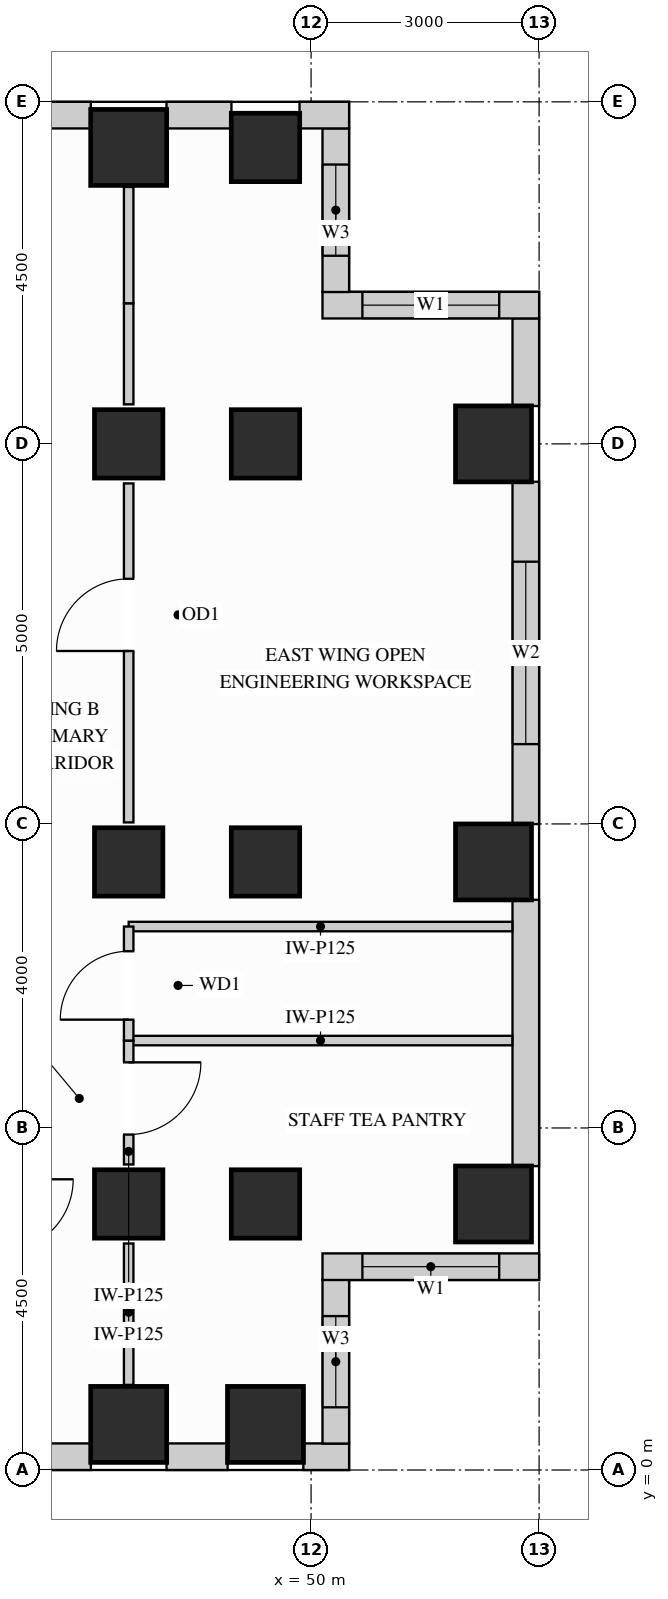
"""IFC4 building model, lengths in metres.
Left out: names, types, materials, properties, quantities, classifications, styles, units other than length and angle.
Written with IfcOpenShell. Run it as: python <this file> out.ifc"""

import sys

from ifc_helpers import new_model, si_unit, direction, frame, frame_2d, origin, origin_2d, place, context, subcontext, project, spatial, rectangle, extrude, source, transform, mapped, element, fill, save


model = new_model("IFC4")
c1 = context("Model", 3, precision=1e-05, world=origin(), true_north=direction((0.0, 1.0)))
c2 = subcontext(c1, "Body", "Model", "MODEL_VIEW")
j1 = project(units=[si_unit("LENGTHUNIT", "METRE"), si_unit("PLANEANGLEUNIT", "RADIAN")], contexts=[c1])
p1 = place(None, origin())
s1 = spatial("IfcSite", under=j1, at=p1, CompositionType="ELEMENT")
p2 = place(p1, origin())
s2 = spatial("IfcBuilding", under=s1, at=p2, CompositionType="ELEMENT")
p3 = place(p2, frame((0.0, 0.0, 200.7)))
s3 = spatial("IfcBuildingStorey", under=s2, at=p3, CompositionType="ELEMENT", Elevation=200.7)
m1 = source(origin(), c2, "Body", "SweptSolid", [
    extrude(rectangle(XDim=0.9, YDim=0.9, at=origin_2d()), origin(), (0.0, 0.0, 1.0), 3.4),
])
for number, where, z_axis, x_axis in (
    (1, (47.6, 13.5, 0.0), (0.0, 0.0, 1.0), (1.0, 0.0, 0.0)),
    (2, (47.6, 3.5, 0.0), (0.0, 0.0, 1.0), (1.0, 0.0, 0.0)),
    (3, (47.6, 8.0, 0.0), (0.0, 0.0, 1.0), (1.0, 0.0, 0.0)),
    (4, (49.4, 13.5, 0.0), (0.0, 0.0, 1.0), (1.0, 0.0, 0.0)),
    (5, (49.4, 17.4, 0.0), (0.0, 0.0, 1.0), (1.0, 0.0, 0.0)),
    (6, (49.4, 3.5, 0.0), (0.0, 0.0, 1.0), (1.0, 0.0, 0.0)),
    (7, (49.4, 8.0, 0.0), (0.0, 0.0, 1.0), (1.0, 0.0, 0.0)),
):
    element("IfcColumn", number, at=place(p3, frame(where, z_axis=z_axis, x_axis=x_axis)), inside=s3, PredefinedType="COLUMN", context=c2, shape_type="MappedRepresentation", body=[
        mapped(m1, transform((0.0, 0.0, 0.0), x_axis=(1.0, 0.0, 0.0), y_axis=(0.0, 1.0, 0.0), z_axis=(0.0, 0.0, 1.0))),
    ])
m2 = source(origin(), c2, "Body", "SweptSolid", [
    extrude(rectangle(XDim=1.0, YDim=1.0, at=origin_2d()), origin(), (0.0, 0.0, 1.0), 3.4),
])
for number, where, z_axis, x_axis in (
    (8, (47.6, 17.4, 0.0), (0.0, 0.0, 1.0), (1.0, 0.0, 0.0)),
    (9, (52.4, 13.5, 0.0), (0.0, 0.0, 1.0), (1.0, 0.0, 0.0)),
    (10, (52.4, 3.5, 0.0), (0.0, 0.0, 1.0), (1.0, 0.0, 0.0)),
    (11, (52.4, 8.0, 0.0), (0.0, 0.0, 1.0), (1.0, 0.0, 0.0)),
    (12, (47.6, 0.6, 0.0), (0.0, 0.0, 1.0), (1.0, 0.0, 0.0)),
    (13, (49.4, 0.6, 0.0), (0.0, 0.0, 1.0), (1.0, 0.0, 0.0)),
):
    element("IfcColumn", number, at=place(p3, frame(where, z_axis=z_axis, x_axis=x_axis)), inside=s3, PredefinedType="COLUMN", context=c2, shape_type="MappedRepresentation", body=[
        mapped(m2, transform((0.0, 0.0, 0.0), x_axis=(1.0, 0.0, 0.0), y_axis=(0.0, 1.0, 0.0), z_axis=(0.0, 0.0, 1.0))),
    ])
p4 = place(p3, frame((40.498, 0.175, 0.0), z_axis=(0.0, 0.0, 1.0), x_axis=(1.0, 0.0, 0.0)))
e14 = element("IfcWall", 14, at=p4, inside=s3, PredefinedType="SOLIDWALL", context=c2, shape_type="SweptSolid", body=[
    extrude(rectangle(XDim=6.604, YDim=0.35, at=frame_2d((3.302, 0.0))), origin(), (0.0, 0.0, 1.0), 2.612),
])
p5 = place(p4, frame((0.737, 0.0, 0.78)))
e15 = element("IfcOpeningElement", 15, at=p5, cuts=e14, PredefinedType="OPENING", context=c2, shape_type="SweptSolid", body=[
    extrude(rectangle(XDim=1.8, YDim=1.652, at=frame_2d((0.9, 0.826))), frame((0.0, 0.185, 0.0), z_axis=(0.0, -1.0, 0.0), x_axis=(1.0, 0.0, 0.0)), (0.0, 0.0, 1.0), 0.37),
])
p6 = place(p4, frame((2.955, 0.0, 0.78)))
e16 = element("IfcOpeningElement", 16, at=p6, cuts=e14, PredefinedType="OPENING", context=c2, shape_type="SweptSolid", body=[
    extrude(rectangle(XDim=1.8, YDim=1.652, at=frame_2d((0.9, 0.826))), frame((0.0, 0.185, 0.0), z_axis=(0.0, -1.0, 0.0), x_axis=(1.0, 0.0, 0.0)), (0.0, 0.0, 1.0), 0.37),
])
m3 = source(origin(), c2, "Body", "SweptSolid", [
    extrude(rectangle(XDim=0.804, YDim=0.35, at=frame_2d((0.402, 0.0))), origin(), (0.0, 0.0, 1.0), 3.385),
])
p7 = place(p3, frame((48.098, 0.175, 0.0), z_axis=(0.0, 0.0, 1.0), x_axis=(1.0, 0.0, 0.0)))
e17 = element("IfcWall", 17, at=p7, inside=s3, PredefinedType="SOLIDWALL", context=c2, shape_type="MappedRepresentation", body=[
    mapped(m3, transform((0.0, 0.0, 0.0), x_axis=(1.0, 0.0, 0.0), y_axis=(0.0, 1.0, 0.0), z_axis=(0.0, 0.0, 1.0))),
])
m4 = source(origin(), c2, "Body", "SweptSolid", [
    extrude(rectangle(XDim=0.602, YDim=0.35, at=frame_2d((0.301, 0.0))), origin(), (0.0, 0.0, 1.0), 3.385),
])
p8 = place(p3, frame((49.898, 0.175, 0.0), z_axis=(0.0, 0.0, 1.0), x_axis=(1.0, 0.0, 0.0)))
e18 = element("IfcWall", 18, at=p8, inside=s3, PredefinedType="SOLIDWALL", context=c2, shape_type="MappedRepresentation", body=[
    mapped(m4, transform((0.0, 0.0, 0.0), x_axis=(1.0, 0.0, 0.0), y_axis=(0.0, 1.0, 0.0), z_axis=(0.0, 0.0, 1.0))),
])
p9 = place(p3, frame((50.325, 0.348, 0.0), z_axis=(0.0, 0.0, 1.0), x_axis=(0.0, 1.0, 0.0)))
e19 = element("IfcWall", 19, at=p9, inside=s3, PredefinedType="SOLIDWALL", context=c2, shape_type="SweptSolid", body=[
    extrude(rectangle(XDim=2.154, YDim=0.35, at=frame_2d((1.077, 0.0))), origin(), (0.0, 0.0, 1.0), 3.385),
])
p10 = place(p9, frame((0.477, 0.0, 0.78)))
e20 = element("IfcOpeningElement", 20, at=p10, cuts=e19, PredefinedType="OPENING", context=c2, shape_type="SweptSolid", body=[
    extrude(rectangle(XDim=1.2, YDim=2.1, at=frame_2d((0.6, 1.05))), frame((0.0, 0.185, 0.0), z_axis=(0.0, -1.0, 0.0), x_axis=(1.0, 0.0, 0.0)), (0.0, 0.0, 1.0), 0.37),
])
p11 = place(p3, frame((50.15, 2.675, 0.0), z_axis=(0.0, 0.0, 1.0), x_axis=(1.0, 0.0, 0.0)))
e21 = element("IfcWall", 21, at=p11, inside=s3, PredefinedType="SOLIDWALL", context=c2, shape_type="SweptSolid", body=[
    extrude(rectangle(XDim=2.85, YDim=0.35, at=frame_2d((1.425, 0.0))), origin(), (0.0, 0.0, 1.0), 3.385),
])
p12 = place(p11, frame((0.525, 0.0, 0.78)))
e22 = element("IfcOpeningElement", 22, at=p12, cuts=e21, PredefinedType="OPENING", context=c2, shape_type="SweptSolid", body=[
    extrude(rectangle(XDim=1.8, YDim=2.1, at=frame_2d((0.9, 1.05))), frame((0.0, 0.185, 0.0), z_axis=(0.0, -1.0, 0.0), x_axis=(1.0, 0.0, 0.0)), (0.0, 0.0, 1.0), 0.37),
])
m5 = source(origin(), c2, "Body", "SweptSolid", [
    extrude(rectangle(XDim=3.504, YDim=0.35, at=frame_2d((1.752, 0.0))), origin(), (0.0, 0.0, 1.0), 2.612),
])
p13 = place(p3, frame((52.825, 3.998, 0.0), z_axis=(0.0, 0.0, 1.0), x_axis=(0.0, 1.0, 0.0)))
e23 = element("IfcWall", 23, at=p13, inside=s3, PredefinedType="SOLIDWALL", context=c2, shape_type="MappedRepresentation", body=[
    mapped(m5, transform((0.0, 0.0, 0.0), x_axis=(1.0, 0.0, 0.0), y_axis=(0.0, 1.0, 0.0), z_axis=(0.0, 0.0, 1.0))),
])
p14 = place(p3, frame((52.825, 8.498, 0.0), z_axis=(0.0, 0.0, 1.0), x_axis=(0.0, 1.0, 0.0)))
e24 = element("IfcWall", 24, at=p14, inside=s3, PredefinedType="SOLIDWALL", context=c2, shape_type="SweptSolid", body=[
    extrude(rectangle(XDim=4.504, YDim=0.35, at=frame_2d((2.252, 0.0))), origin(), (0.0, 0.0, 1.0), 2.612),
])
p15 = place(p14, frame((1.052, 0.0, 0.78)))
e25 = element("IfcOpeningElement", 25, at=p15, cuts=e24, PredefinedType="OPENING", context=c2, shape_type="SweptSolid", body=[
    extrude(rectangle(XDim=2.4, YDim=1.652, at=frame_2d((1.2, 0.826))), frame((0.0, 0.185, 0.0), z_axis=(0.0, -1.0, 0.0), x_axis=(1.0, 0.0, 0.0)), (0.0, 0.0, 1.0), 0.37),
])
m6 = source(origin(), c2, "Body", "SweptSolid", [
    extrude(rectangle(XDim=1.154, YDim=0.35, at=frame_2d((0.577, 0.0))), origin(), (0.0, 0.0, 1.0), 3.385),
])
p16 = place(p3, frame((52.825, 13.998, 0.0), z_axis=(0.0, 0.0, 1.0), x_axis=(0.0, 1.0, 0.0)))
e26 = element("IfcWall", 26, at=p16, inside=s3, PredefinedType="SOLIDWALL", context=c2, shape_type="MappedRepresentation", body=[
    mapped(m6, transform((0.0, 0.0, 0.0), x_axis=(1.0, 0.0, 0.0), y_axis=(0.0, 1.0, 0.0), z_axis=(0.0, 0.0, 1.0))),
])
p17 = place(p3, frame((53.0, 15.325, 0.0), z_axis=(0.0, 0.0, 1.0), x_axis=(-1.0, 0.0, 0.0)))
e27 = element("IfcWall", 27, at=p17, inside=s3, PredefinedType="SOLIDWALL", context=c2, shape_type="SweptSolid", body=[
    extrude(rectangle(XDim=2.85, YDim=0.35, at=frame_2d((1.425, 0.0))), origin(), (0.0, 0.0, 1.0), 3.385),
])
p18 = place(p17, frame((0.525, 0.0, 0.78)))
e28 = element("IfcOpeningElement", 28, at=p18, cuts=e27, PredefinedType="OPENING", context=c2, shape_type="SweptSolid", body=[
    extrude(rectangle(XDim=1.8, YDim=2.1, at=frame_2d((0.9, 1.05))), frame((0.0, 0.185, 0.0), z_axis=(0.0, -1.0, 0.0), x_axis=(1.0, 0.0, 0.0)), (0.0, 0.0, 1.0), 0.37),
])
p19 = place(p3, frame((50.325, 15.498, 0.0), z_axis=(0.0, 0.0, 1.0), x_axis=(0.0, 1.0, 0.0)))
e29 = element("IfcWall", 29, at=p19, inside=s3, PredefinedType="SOLIDWALL", context=c2, shape_type="SweptSolid", body=[
    extrude(rectangle(XDim=2.154, YDim=0.35, at=frame_2d((1.077, 0.0))), origin(), (0.0, 0.0, 1.0), 3.385),
])
p20 = place(p19, frame((0.477, 0.0, 0.78)))
e30 = element("IfcOpeningElement", 30, at=p20, cuts=e29, PredefinedType="OPENING", context=c2, shape_type="SweptSolid", body=[
    extrude(rectangle(XDim=1.2, YDim=2.1, at=frame_2d((0.6, 1.05))), frame((0.0, 0.185, 0.0), z_axis=(0.0, -1.0, 0.0), x_axis=(1.0, 0.0, 0.0)), (0.0, 0.0, 1.0), 0.37),
])
m7 = source(origin(), c2, "Body", "SweptSolid", [
    extrude(rectangle(XDim=0.652, YDim=0.35, at=frame_2d((0.326, 0.0))), origin(), (0.0, 0.0, 1.0), 3.385),
])
p21 = place(p3, frame((50.5, 17.825, 0.0), z_axis=(0.0, 0.0, 1.0), x_axis=(-1.0, 0.0, 0.0)))
e31 = element("IfcWall", 31, at=p21, inside=s3, PredefinedType="SOLIDWALL", context=c2, shape_type="MappedRepresentation", body=[
    mapped(m7, transform((0.0, 0.0, 0.0), x_axis=(1.0, 0.0, 0.0), y_axis=(0.0, 1.0, 0.0), z_axis=(0.0, 0.0, 1.0))),
])
m8 = source(origin(), c2, "Body", "SweptSolid", [
    extrude(rectangle(XDim=0.854, YDim=0.35, at=frame_2d((0.427, 0.0))), origin(), (0.0, 0.0, 1.0), 3.385),
])
p22 = place(p3, frame((48.952, 17.825, 0.0), z_axis=(0.0, 0.0, 1.0), x_axis=(-1.0, 0.0, 0.0)))
e32 = element("IfcWall", 32, at=p22, inside=s3, PredefinedType="SOLIDWALL", context=c2, shape_type="MappedRepresentation", body=[
    mapped(m8, transform((0.0, 0.0, 0.0), x_axis=(1.0, 0.0, 0.0), y_axis=(0.0, 1.0, 0.0), z_axis=(0.0, 0.0, 1.0))),
])
p23 = place(p3, frame((47.102, 17.825, 0.0), z_axis=(0.0, 0.0, 1.0), x_axis=(-1.0, 0.0, 0.0)))
e33 = element("IfcWall", 33, at=p23, inside=s3, PredefinedType="SOLIDWALL", context=c2, shape_type="SweptSolid", body=[
    extrude(rectangle(XDim=6.604, YDim=0.35, at=frame_2d((3.302, 0.0))), origin(), (0.0, 0.0, 1.0), 2.612),
])
p24 = place(p23, frame((1.849, 0.0, 0.78)))
e34 = element("IfcOpeningElement", 34, at=p24, cuts=e33, PredefinedType="OPENING", context=c2, shape_type="SweptSolid", body=[
    extrude(rectangle(XDim=1.8, YDim=1.652, at=frame_2d((0.9, 0.826))), frame((0.0, 0.185, 0.0), z_axis=(0.0, -1.0, 0.0), x_axis=(1.0, 0.0, 0.0)), (0.0, 0.0, 1.0), 0.37),
])
p25 = place(p23, frame((4.067, 0.0, 0.78)))
e35 = element("IfcOpeningElement", 35, at=p25, cuts=e33, PredefinedType="OPENING", context=c2, shape_type="SweptSolid", body=[
    extrude(rectangle(XDim=1.8, YDim=1.652, at=frame_2d((0.9, 0.826))), frame((0.0, 0.185, 0.0), z_axis=(0.0, -1.0, 0.0), x_axis=(1.0, 0.0, 0.0)), (0.0, 0.0, 1.0), 0.37),
])
m9 = source(origin(), c2, "Body", "SweptSolid", [
    extrude(rectangle(XDim=5.048, YDim=0.125, at=frame_2d((2.524, 0.0))), origin(), (0.0, 0.0, 1.0), 3.385),
])
for number, where, z_axis, x_axis in (
    (36, (47.6, 5.65, 0.0), (0.0, 0.0, 1.0), (1.0, 0.0, 0.0)),
    (37, (47.6, 7.15, 0.0), (0.0, 0.0, 1.0), (1.0, 0.0, 0.0)),
):
    element("IfcWall", number, at=place(p3, frame(where, z_axis=z_axis, x_axis=x_axis)), inside=s3, PredefinedType="PARTITIONING", context=c2, shape_type="MappedRepresentation", body=[
        mapped(m9, transform((0.0, 0.0, 0.0), x_axis=(1.0, 0.0, 0.0), y_axis=(0.0, 1.0, 0.0), z_axis=(0.0, 0.0, 1.0))),
    ])
p26 = place(p3, frame((47.6, 4.02, 0.0), z_axis=(0.0, 0.0, 1.0), x_axis=(0.0, 1.0, 0.0)))
e38 = element("IfcWall", 38, at=p26, inside=s3, PredefinedType="PARTITIONING", context=c2, shape_type="SweptSolid", body=[
    extrude(rectangle(XDim=1.63, YDim=0.125, at=frame_2d((0.815, 0.0))), origin(), (0.0, 0.0, 1.0), 2.773),
])
p27 = place(p26, frame((0.393, 0.0, 0.0)))
e39 = element("IfcOpeningElement", 39, at=p27, cuts=e38, PredefinedType="OPENING", context=c2, shape_type="SweptSolid", body=[
    extrude(rectangle(XDim=0.95, YDim=2.15, at=frame_2d((0.475, 1.075))), frame((0.0, 0.073, 0.0), z_axis=(0.0, -1.0, 0.0), x_axis=(1.0, 0.0, 0.0)), (0.0, 0.0, 1.0), 0.145),
])
m10 = source(origin(), c2, "Body", "SweptSolid", [
    extrude(rectangle(XDim=1.86, YDim=0.125, at=frame_2d((0.93, 0.0))), origin(), (0.0, 0.0, 1.0), 2.773),
])
p28 = place(p3, frame((47.6, 1.12, 0.0), z_axis=(0.0, 0.0, 1.0), x_axis=(0.0, 1.0, 0.0)))
e40 = element("IfcWall", 40, at=p28, inside=s3, PredefinedType="PARTITIONING", context=c2, shape_type="MappedRepresentation", body=[
    mapped(m10, transform((0.0, 0.0, 0.0), x_axis=(1.0, 0.0, 0.0), y_axis=(0.0, 1.0, 0.0), z_axis=(0.0, 0.0, 1.0))),
])
p29 = place(p3, frame((47.6, 8.52, 0.0), z_axis=(0.0, 0.0, 1.0), x_axis=(0.0, 1.0, 0.0)))
e41 = element("IfcWall", 41, at=p29, inside=s3, PredefinedType="PARTITIONING", context=c2, shape_type="SweptSolid", body=[
    extrude(rectangle(XDim=4.46, YDim=0.125, at=frame_2d((2.23, 0.0))), origin(), (0.0, 0.0, 1.0), 2.773),
])
p30 = place(p29, frame((2.255, 0.0, 0.0)))
e42 = element("IfcOpeningElement", 42, at=p30, cuts=e41, PredefinedType="OPENING", context=c2, shape_type="SweptSolid", body=[
    extrude(rectangle(XDim=0.95, YDim=2.15, at=frame_2d((0.475, 1.075))), frame((0.0, 0.073, 0.0), z_axis=(0.0, -1.0, 0.0), x_axis=(1.0, 0.0, 0.0)), (0.0, 0.0, 1.0), 0.145),
])
m11 = source(origin(), c2, "Body", "SweptSolid", [
    extrude(rectangle(XDim=1.33, YDim=0.125, at=frame_2d((0.665, 0.0))), origin(), (0.0, 0.0, 1.0), 2.773),
])
p31 = place(p3, frame((47.6, 14.02, 0.0), z_axis=(0.0, 0.0, 1.0), x_axis=(0.0, 1.0, 0.0)))
e43 = element("IfcWall", 43, at=p31, inside=s3, PredefinedType="PARTITIONING", context=c2, shape_type="MappedRepresentation", body=[
    mapped(m11, transform((0.0, 0.0, 0.0), x_axis=(1.0, 0.0, 0.0), y_axis=(0.0, 1.0, 0.0), z_axis=(0.0, 0.0, 1.0))),
])
m12 = source(origin(), c2, "Body", "SweptSolid", [
    extrude(rectangle(XDim=1.53, YDim=0.125, at=frame_2d((0.765, 0.0))), origin(), (0.0, 0.0, 1.0), 2.773),
])
p32 = place(p3, frame((47.6, 15.35, 0.0), z_axis=(0.0, 0.0, 1.0), x_axis=(0.0, 1.0, 0.0)))
e44 = element("IfcWall", 44, at=p32, inside=s3, PredefinedType="PARTITIONING", context=c2, shape_type="MappedRepresentation", body=[
    mapped(m12, transform((0.0, 0.0, 0.0), x_axis=(1.0, 0.0, 0.0), y_axis=(0.0, 1.0, 0.0), z_axis=(0.0, 0.0, 1.0))),
])
p33 = place(p3, frame((47.6, 5.65, 0.0), z_axis=(0.0, 0.0, 1.0), x_axis=(0.0, 1.0, 0.0)))
e45 = element("IfcWall", 45, at=p33, inside=s3, PredefinedType="PARTITIONING", context=c2, shape_type="SweptSolid", body=[
    extrude(rectangle(XDim=1.5, YDim=0.125, at=frame_2d((0.75, 0.0))), origin(), (0.0, 0.0, 1.0), 2.773),
])
p34 = place(p33, frame((0.275, 0.0, 0.0)))
e46 = element("IfcOpeningElement", 46, at=p34, cuts=e45, PredefinedType="OPENING", context=c2, shape_type="SweptSolid", body=[
    extrude(rectangle(XDim=0.9, YDim=2.15, at=frame_2d((0.45, 1.075))), frame((0.0, 0.073, 0.0), z_axis=(0.0, -1.0, 0.0), x_axis=(1.0, 0.0, 0.0)), (0.0, 0.0, 1.0), 0.145),
])
m13 = source(origin(), c2, "Body", "SweptSolid", [
    extrude(rectangle(XDim=0.95, YDim=2.15, at=frame_2d((0.475, 1.075))), frame((0.0, 0.025, 0.0), z_axis=(0.0, -1.0, 0.0), x_axis=(1.0, 0.0, 0.0)), (0.0, 0.0, 1.0), 0.05),
])
p35 = place(p27, origin())
e47 = element("IfcDoor", 47, at=p35, inside=s3, OperationType="SINGLE_SWING_RIGHT", PredefinedType="DOOR", context=c2, shape_type="MappedRepresentation", body=[
    mapped(m13, transform((0.0, 0.0, 0.0), x_axis=(1.0, 0.0, 0.0), y_axis=(0.0, 1.0, 0.0), z_axis=(0.0, 0.0, 1.0))),
])
fill(e39, e47)
p36 = place(p30, origin())
e48 = element("IfcDoor", 48, at=p36, inside=s3, OperationType="SINGLE_SWING_LEFT", PredefinedType="DOOR", context=c2, shape_type="MappedRepresentation", body=[
    mapped(m13, transform((0.0, 0.0, 0.0), x_axis=(1.0, 0.0, 0.0), y_axis=(0.0, 1.0, 0.0), z_axis=(0.0, 0.0, 1.0))),
])
fill(e42, e48)
m14 = source(origin(), c2, "Body", "SweptSolid", [
    extrude(rectangle(XDim=0.9, YDim=2.15, at=frame_2d((0.45, 1.075))), frame((0.0, 0.025, 0.0), z_axis=(0.0, -1.0, 0.0), x_axis=(1.0, 0.0, 0.0)), (0.0, 0.0, 1.0), 0.05),
])
p37 = place(p34, origin())
e49 = element("IfcDoor", 49, at=p37, inside=s3, OperationType="SINGLE_SWING_LEFT", PredefinedType="DOOR", context=c2, shape_type="MappedRepresentation", body=[
    mapped(m14, transform((0.0, 0.0, 0.0), x_axis=(1.0, 0.0, 0.0), y_axis=(0.0, 1.0, 0.0), z_axis=(0.0, 0.0, 1.0))),
])
fill(e46, e49)
m15 = source(origin(), c2, "Body", "SweptSolid", [
    extrude(rectangle(XDim=1.8, YDim=2.1, at=frame_2d((0.9, 1.05))), frame((0.0, 0.03, 0.0), z_axis=(0.0, -1.0, 0.0), x_axis=(1.0, 0.0, 0.0)), (0.0, 0.0, 1.0), 0.06),
])
p38 = place(p12, origin())
e50 = element("IfcWindow", 50, at=p38, inside=s3, PartitioningType="SINGLE_PANEL", PredefinedType="WINDOW", context=c2, shape_type="MappedRepresentation", body=[
    mapped(m15, transform((0.0, 0.0, 0.0), x_axis=(1.0, 0.0, 0.0), y_axis=(0.0, 1.0, 0.0), z_axis=(0.0, 0.0, 1.0))),
])
fill(e22, e50)
p39 = place(p18, origin())
e51 = element("IfcWindow", 51, at=p39, inside=s3, PartitioningType="SINGLE_PANEL", PredefinedType="WINDOW", context=c2, shape_type="MappedRepresentation", body=[
    mapped(m15, transform((0.0, 0.0, 0.0), x_axis=(1.0, 0.0, 0.0), y_axis=(0.0, 1.0, 0.0), z_axis=(0.0, 0.0, 1.0))),
])
fill(e28, e51)
m16 = source(origin(), c2, "Body", "SweptSolid", [
    extrude(rectangle(XDim=2.4, YDim=1.652, at=frame_2d((1.2, 0.826))), frame((0.0, 0.03, 0.0), z_axis=(0.0, -1.0, 0.0), x_axis=(1.0, 0.0, 0.0)), (0.0, 0.0, 1.0), 0.06),
])
p40 = place(p15, origin())
e52 = element("IfcWindow", 52, at=p40, inside=s3, PartitioningType="SINGLE_PANEL", PredefinedType="WINDOW", context=c2, shape_type="MappedRepresentation", body=[
    mapped(m16, transform((0.0, 0.0, 0.0), x_axis=(1.0, 0.0, 0.0), y_axis=(0.0, 1.0, 0.0), z_axis=(0.0, 0.0, 1.0))),
])
fill(e25, e52)
m17 = source(origin(), c2, "Body", "SweptSolid", [
    extrude(rectangle(XDim=1.2, YDim=2.1, at=frame_2d((0.6, 1.05))), frame((0.0, 0.03, 0.0), z_axis=(0.0, -1.0, 0.0), x_axis=(1.0, 0.0, 0.0)), (0.0, 0.0, 1.0), 0.06),
])
p41 = place(p10, origin())
e53 = element("IfcWindow", 53, at=p41, inside=s3, PartitioningType="SINGLE_PANEL", PredefinedType="WINDOW", context=c2, shape_type="MappedRepresentation", body=[
    mapped(m17, transform((0.0, 0.0, 0.0), x_axis=(1.0, 0.0, 0.0), y_axis=(0.0, 1.0, 0.0), z_axis=(0.0, 0.0, 1.0))),
])
fill(e20, e53)
p42 = place(p20, origin())
e54 = element("IfcWindow", 54, at=p42, inside=s3, PartitioningType="SINGLE_PANEL", PredefinedType="WINDOW", context=c2, shape_type="MappedRepresentation", body=[
    mapped(m17, transform((0.0, 0.0, 0.0), x_axis=(1.0, 0.0, 0.0), y_axis=(0.0, 1.0, 0.0), z_axis=(0.0, 0.0, 1.0))),
])
fill(e30, e54)
save(model, sys.argv[1])
